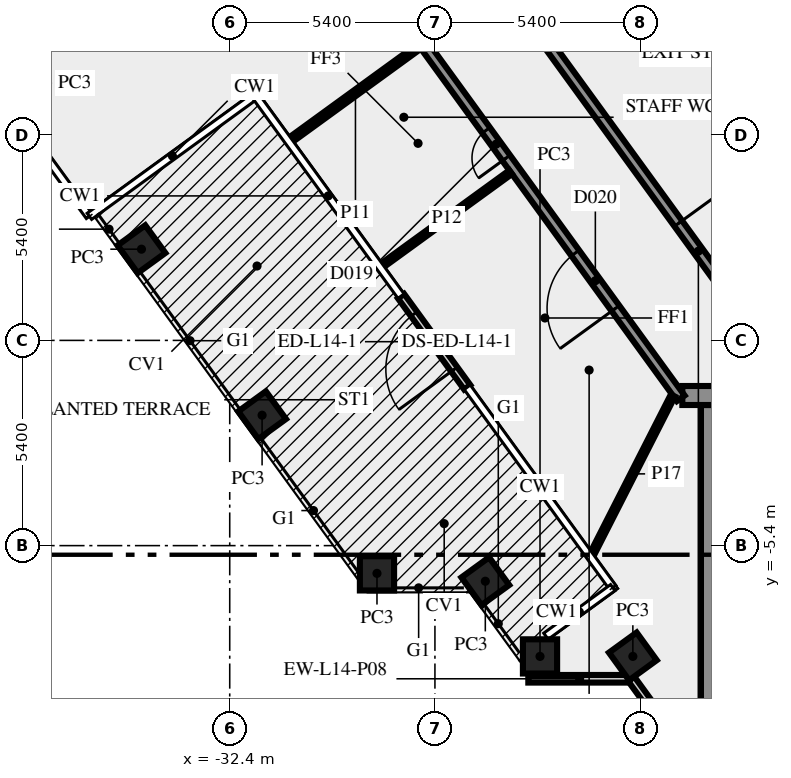
"""IFC4 building model, lengths in metres.
Left out: names, types, materials, properties, quantities, classifications, styles, units other than length and angle.
Written with IfcOpenShell. Run it as: python <this file> out.ifc"""

import sys

from ifc_helpers import new_model, si_unit, direction, frame, frame_2d, origin, origin_2d, place, context, subcontext, project, spatial, rectangle, extrude, element, fill, save


model = new_model("IFC4")
c1 = context("Model", 3, precision=1e-05, world=origin(), true_north=direction((0.0, 1.0)))
c2 = subcontext(c1, "Body", "Model", "MODEL_VIEW")
j1 = project(units=[si_unit("LENGTHUNIT", "METRE"), si_unit("PLANEANGLEUNIT", "RADIAN")], contexts=[c1])
p1 = place(None, origin())
s1 = spatial("IfcSite", under=j1, at=p1, CompositionType="ELEMENT")
p2 = place(p1, origin())
s2 = spatial("IfcBuilding", under=s1, at=p2, CompositionType="ELEMENT")
p3 = place(p2, frame((0.0, 0.0, 63.0)))
s3 = spatial("IfcBuildingStorey", under=s2, at=p3, CompositionType="ELEMENT", Elevation=63.0)
for number, where, z_axis, x_axis in (
    (1, (-34.722, 2.4, 0.0), (0.0, 0.0, 1.0), (0.588, -0.809, 0.0)),
    (2, (-31.548, -1.969, 0.0), (0.0, 0.0, 1.0), (0.588, -0.809, 0.0)),
    (3, (-28.525, -6.13, 0.0), (0.0, 0.0, 1.0), (1.0, 0.0, 0.0)),
    (4, (-25.674, -6.337, 0.0), (0.0, 0.0, 1.0), (0.588, -0.809, 0.0)),
    (5, (-24.235, -8.315, 0.0), (0.0, 0.0, 1.0), (1.0, 0.0, 0.0)),
    (6, (-21.792, -8.315, 0.0), (0.0, 0.0, 1.0), (0.588, -0.809, 0.0)),
):
    element("IfcColumn", number, at=place(p3, frame(where, z_axis=z_axis, x_axis=x_axis)), inside=s3, PredefinedType="COLUMN", context=c2, shape_type="SweptSolid", body=[
        extrude(rectangle(XDim=0.9, YDim=0.9, at=origin_2d()), origin(), (0.0, 0.0, 1.0), 3.65),
    ])
p4 = place(p3, frame((-24.543, -8.904, 0.0), z_axis=(0.0, 0.0, 1.0), x_axis=(1.0, 0.0, 0.0)))
e7 = element("IfcWall", 7, at=p4, inside=s3, PredefinedType="SOLIDWALL", context=c2, shape_type="SweptSolid", body=[
    extrude(rectangle(XDim=2.7, YDim=0.2, at=frame_2d((1.35, 0.0))), origin(), (0.0, 0.0, 1.0), 3.65),
])
p5 = place(p3, frame((-21.833, -8.909, 0.0), z_axis=(0.0, 0.0, 1.0), x_axis=(0.587766567315, -0.809030569476, 0.0)))
e8 = element("IfcWall", 8, at=p5, inside=s3, PredefinedType="SOLIDWALL", context=c2, shape_type="SweptSolid", body=[
    extrude(rectangle(XDim=2.688, YDim=0.2, at=frame_2d((1.344, 0.0))), origin(), (0.0, 0.0, 1.0), 3.65),
])
p6 = place(p3, frame((-26.15, -1.232, 0.0), z_axis=(0.0, 0.0, 1.0), x_axis=(-0.58782869016, 0.808985433135, 0.0)))
e9 = element("IfcWall", 9, at=p6, inside=s3, PredefinedType="SOLIDWALL", context=c2, shape_type="SweptSolid", body=[
    extrude(rectangle(XDim=2.963, YDim=0.2, at=frame_2d((1.481, 0.0))), origin(), (0.0, 0.0, 1.0), 3.65),
])
p7 = place(p6, frame((0.582, 0.0, 0.0)))
e10 = element("IfcOpeningElement", 10, at=p7, cuts=e9, PredefinedType="OPENING", context=c2, shape_type="SweptSolid", body=[
    extrude(rectangle(XDim=1.8, YDim=2.4, at=frame_2d((0.9, 1.2))), frame((0.0, 0.11, 0.0), z_axis=(0.0, -1.0, 0.0), x_axis=(1.0, 0.0, 0.0)), (0.0, 0.0, 1.0), 0.22),
])
p8 = place(p3, frame((-19.75, -10.5, 0.0), z_axis=(0.0, 0.0, 1.0), x_axis=(0.0, 1.0, 0.0)))
e11 = element("IfcWall", 11, at=p8, inside=s3, PredefinedType="SHEAR", context=c2, shape_type="SweptSolid", body=[
    extrude(rectangle(XDim=8.8, YDim=0.5, at=frame_2d((4.4, 0.0))), origin(), (0.0, 0.0, 1.0), 3.65),
])
p9 = place(p3, frame((20.49, -1.45, 0.0), z_axis=(0.0, 0.0, 1.0), x_axis=(-1.0, 0.0, 0.0)))
e12 = element("IfcWall", 12, at=p9, inside=s3, PredefinedType="SHEAR", context=c2, shape_type="SweptSolid", body=[
    extrude(rectangle(XDim=40.98, YDim=0.5, at=frame_2d((20.49, 0.0))), origin(), (0.0, 0.0, 1.0), 3.65),
])
p10 = place(p9, frame((38.14, 0.0, 0.0)))
e13 = element("IfcOpeningElement", 13, at=p10, cuts=e12, PredefinedType="OPENING", context=c2, shape_type="SweptSolid", body=[
    extrude(rectangle(XDim=1.8, YDim=2.1, at=frame_2d((0.9, 1.05))), frame((0.0, 0.26, 0.0), z_axis=(0.0, -1.0, 0.0), x_axis=(1.0, 0.0, 0.0)), (0.0, 0.0, 1.0), 0.52),
])
p11 = place(p9, frame((35.89, 0.0, 0.0)))
e14 = element("IfcOpeningElement", 14, at=p11, cuts=e12, PredefinedType="OPENING", context=c2, shape_type="SweptSolid", body=[
    extrude(rectangle(XDim=0.9, YDim=2.1, at=frame_2d((0.45, 1.05))), frame((0.0, 0.26, 0.0), z_axis=(0.0, -1.0, 0.0), x_axis=(1.0, 0.0, 0.0)), (0.0, 0.0, 1.0), 0.52),
])
p12 = place(p9, frame((32.94, 0.0, 0.0)))
e15 = element("IfcOpeningElement", 15, at=p12, cuts=e12, PredefinedType="OPENING", context=c2, shape_type="SweptSolid", body=[
    extrude(rectangle(XDim=0.9, YDim=2.1, at=frame_2d((0.45, 1.05))), frame((0.0, 0.26, 0.0), z_axis=(0.0, -1.0, 0.0), x_axis=(1.0, 0.0, 0.0)), (0.0, 0.0, 1.0), 0.52),
])
p13 = place(p9, frame((19.59, 0.0, 0.0)))
e16 = element("IfcOpeningElement", 16, at=p13, cuts=e12, PredefinedType="OPENING", context=c2, shape_type="SweptSolid", body=[
    extrude(rectangle(XDim=2.0, YDim=2.1, at=frame_2d((1.0, 1.05))), frame((0.0, 0.26, 0.0), z_axis=(0.0, -1.0, 0.0), x_axis=(1.0, 0.0, 0.0)), (0.0, 0.0, 1.0), 0.52),
])
p14 = place(p9, frame((7.14, 0.0, 0.0)))
e17 = element("IfcOpeningElement", 17, at=p14, cuts=e12, PredefinedType="OPENING", context=c2, shape_type="SweptSolid", body=[
    extrude(rectangle(XDim=0.9, YDim=2.1, at=frame_2d((0.45, 1.05))), frame((0.0, 0.26, 0.0), z_axis=(0.0, -1.0, 0.0), x_axis=(1.0, 0.0, 0.0)), (0.0, 0.0, 1.0), 0.52),
])
p15 = place(p9, frame((5.028, 0.0, 0.0)))
e18 = element("IfcOpeningElement", 18, at=p15, cuts=e12, PredefinedType="OPENING", context=c2, shape_type="SweptSolid", body=[
    extrude(rectangle(XDim=0.8, YDim=2.1, at=frame_2d((0.4, 1.05))), frame((0.0, 0.26, 0.0), z_axis=(0.0, -1.0, 0.0), x_axis=(1.0, 0.0, 0.0)), (0.0, 0.0, 1.0), 0.52),
])
p16 = place(p9, frame((3.452, 0.0, 0.0)))
e19 = element("IfcOpeningElement", 19, at=p16, cuts=e12, PredefinedType="OPENING", context=c2, shape_type="SweptSolid", body=[
    extrude(rectangle(XDim=0.8, YDim=2.1, at=frame_2d((0.4, 1.05))), frame((0.0, 0.26, 0.0), z_axis=(0.0, -1.0, 0.0), x_axis=(1.0, 0.0, 0.0)), (0.0, 0.0, 1.0), 0.52),
])
p17 = place(p9, frame((1.04, 0.0, 0.0)))
e20 = element("IfcOpeningElement", 20, at=p17, cuts=e12, PredefinedType="OPENING", context=c2, shape_type="SweptSolid", body=[
    extrude(rectangle(XDim=1.8, YDim=2.1, at=frame_2d((0.9, 1.05))), frame((0.0, 0.26, 0.0), z_axis=(0.0, -1.0, 0.0), x_axis=(1.0, 0.0, 0.0)), (0.0, 0.0, 1.0), 0.52),
])
p18 = place(p3, frame((-20.531, -1.523, 0.0), z_axis=(0.0, 0.0, 1.0), x_axis=(-0.587784593204, 0.809017473231, 0.0)))
e21 = element("IfcWall", 21, at=p18, inside=s3, PredefinedType="SOLIDWALL", context=c2, shape_type="SweptSolid", body=[
    extrude(rectangle(XDim=44.67, YDim=0.25, at=frame_2d((22.335, 0.0))), origin(), (0.0, 0.0, 1.0), 3.65),
])
p19 = place(p18, frame((43.046, 0.0, 0.0)))
e22 = element("IfcOpeningElement", 22, at=p19, cuts=e21, PredefinedType="OPENING", context=c2, shape_type="SweptSolid", body=[
    extrude(rectangle(XDim=1.2, YDim=2.1, at=frame_2d((0.6, 1.05))), frame((0.0, 0.135, 0.0), z_axis=(0.0, -1.0, 0.0), x_axis=(1.0, 0.0, 0.0)), (0.0, 0.0, 1.0), 0.27),
])
p20 = place(p18, frame((21.266, 0.0, 0.0)))
e23 = element("IfcOpeningElement", 23, at=p20, cuts=e21, PredefinedType="OPENING", context=c2, shape_type="SweptSolid", body=[
    extrude(rectangle(XDim=1.2, YDim=2.1, at=frame_2d((0.6, 1.05))), frame((0.0, 0.135, 0.0), z_axis=(0.0, -1.0, 0.0), x_axis=(1.0, 0.0, 0.0)), (0.0, 0.0, 1.0), 0.27),
])
p21 = place(p18, frame((17.015, 0.0, 0.0)))
e24 = element("IfcOpeningElement", 24, at=p21, cuts=e21, PredefinedType="OPENING", context=c2, shape_type="SweptSolid", body=[
    extrude(rectangle(XDim=0.9, YDim=2.1, at=frame_2d((0.45, 1.05))), frame((0.0, 0.135, 0.0), z_axis=(0.0, -1.0, 0.0), x_axis=(1.0, 0.0, 0.0)), (0.0, 0.0, 1.0), 0.27),
])
p22 = place(p18, frame((2.924, 0.0, 0.0)))
e25 = element("IfcOpeningElement", 25, at=p22, cuts=e21, PredefinedType="OPENING", context=c2, shape_type="SweptSolid", body=[
    extrude(rectangle(XDim=1.8, YDim=2.1, at=frame_2d((0.9, 1.05))), frame((0.0, 0.135, 0.0), z_axis=(0.0, -1.0, 0.0), x_axis=(1.0, 0.0, 0.0)), (0.0, 0.0, 1.0), 0.27),
])
p23 = place(p18, frame((18.616, 0.0, 0.0)))
e26 = element("IfcOpeningElement", 26, at=p23, cuts=e21, PredefinedType="OPENING", context=c2, shape_type="SweptSolid", body=[
    extrude(rectangle(XDim=0.9, YDim=2.1, at=frame_2d((0.45, 1.05))), frame((0.0, 0.135, 0.0), z_axis=(0.0, -1.0, 0.0), x_axis=(1.0, 0.0, 0.0)), (0.0, 0.0, 1.0), 0.27),
])
p24 = place(p18, frame((7.816, 0.0, 0.0)))
e27 = element("IfcOpeningElement", 27, at=p24, cuts=e21, PredefinedType="OPENING", context=c2, shape_type="SweptSolid", body=[
    extrude(rectangle(XDim=0.9, YDim=2.1, at=frame_2d((0.45, 1.05))), frame((0.0, 0.135, 0.0), z_axis=(0.0, -1.0, 0.0), x_axis=(1.0, 0.0, 0.0)), (0.0, 0.0, 1.0), 0.27),
])
p25 = place(p3, frame((-37.232, 25.972, 0.0), z_axis=(0.0, 0.0, 1.0), x_axis=(0.587786323093, -0.809016216391, 0.0)))
e28 = element("IfcWall", 28, at=p25, inside=s3, PredefinedType="SOLIDWALL", context=c2, shape_type="SweptSolid", body=[
    extrude(rectangle(XDim=33.493, YDim=0.25, at=frame_2d((16.747, 0.0))), origin(), (0.0, 0.0, 1.0), 3.65),
])
p26 = place(p25, frame((28.301, 0.0, 0.0)))
e29 = element("IfcOpeningElement", 29, at=p26, cuts=e28, PredefinedType="OPENING", context=c2, shape_type="SweptSolid", body=[
    extrude(rectangle(XDim=1.8, YDim=2.1, at=frame_2d((0.9, 1.05))), frame((0.0, 0.135, 0.0), z_axis=(0.0, -1.0, 0.0), x_axis=(1.0, 0.0, 0.0)), (0.0, 0.0, 1.0), 0.27),
])
p27 = place(p25, frame((4.235, 0.0, 0.0)))
e30 = element("IfcOpeningElement", 30, at=p27, cuts=e28, PredefinedType="OPENING", context=c2, shape_type="SweptSolid", body=[
    extrude(rectangle(XDim=1.8, YDim=2.1, at=frame_2d((0.9, 1.05))), frame((0.0, 0.135, 0.0), z_axis=(0.0, -1.0, 0.0), x_axis=(1.0, 0.0, 0.0)), (0.0, 0.0, 1.0), 0.27),
])
p28 = place(p25, frame((2.685, 0.0, 0.0)))
e31 = element("IfcOpeningElement", 31, at=p28, cuts=e28, PredefinedType="OPENING", context=c2, shape_type="SweptSolid", body=[
    extrude(rectangle(XDim=0.9, YDim=2.1, at=frame_2d((0.45, 1.05))), frame((0.0, 0.135, 0.0), z_axis=(0.0, -1.0, 0.0), x_axis=(1.0, 0.0, 0.0)), (0.0, 0.0, 1.0), 0.27),
])
p29 = place(p3, frame((-31.356, 13.164, 0.0), z_axis=(0.0, 0.0, 1.0), x_axis=(-0.809102944047, -0.587666934526, 0.0)))
e32 = element("IfcWall", 32, at=p29, inside=s3, PredefinedType="PARTITIONING", context=c2, shape_type="SweptSolid", body=[
    extrude(rectangle(XDim=9.55, YDim=0.15, at=frame_2d((4.775, 0.0))), origin(), (0.0, 0.0, 1.0), 2.75),
])
p30 = place(p3, frame((-30.77, 5.296, 0.0), z_axis=(0.0, 0.0, 1.0), x_axis=(0.80906417205, 0.587720312313, 0.0)))
e33 = element("IfcWall", 33, at=p30, inside=s3, PredefinedType="PARTITIONING", context=c2, shape_type="SweptSolid", body=[
    extrude(rectangle(XDim=4.149, YDim=0.15, at=frame_2d((2.075, 0.0))), origin(), (0.0, 0.0, 1.0), 3.65),
])
p31 = place(p3, frame((-25.008, 4.427, 0.0), z_axis=(0.0, 0.0, 1.0), x_axis=(-0.809020893444, -0.587779885646, 0.0)))
e34 = element("IfcWall", 34, at=p31, inside=s3, PredefinedType="PARTITIONING", context=c2, shape_type="SweptSolid", body=[
    extrude(rectangle(XDim=4.15, YDim=0.12, at=frame_2d((2.075, 0.0))), origin(), (0.0, 0.0, 1.0), 3.65),
])
p32 = place(p3, frame((-22.84, -5.574, 0.0), z_axis=(0.0, 0.0, 1.0), x_axis=(0.453931312426, 0.891036679155, 0.0)))
e35 = element("IfcWall", 35, at=p32, inside=s3, PredefinedType="PARTITIONING", context=c2, shape_type="SweptSolid", body=[
    extrude(rectangle(XDim=4.629, YDim=0.12, at=frame_2d((2.314, 0.0))), origin(), (0.0, 0.0, 1.0), 3.65),
])
p33 = place(p7, origin())
e36 = element("IfcDoor", 36, at=p33, inside=s3, OperationType="DOUBLE_DOOR_SINGLE_SWING", PredefinedType="DOOR", context=c2, shape_type="SweptSolid", body=[
    extrude(rectangle(XDim=1.8, YDim=2.4, at=frame_2d((0.9, 1.2))), frame((0.0, 0.025, 0.0), z_axis=(0.0, -1.0, 0.0), x_axis=(1.0, 0.0, 0.0)), (0.0, 0.0, 1.0), 0.05),
])
fill(e10, e36)
p34 = place(p26, origin())
e37 = element("IfcDoor", 37, at=p34, inside=s3, OperationType="DOUBLE_DOOR_SINGLE_SWING", PredefinedType="DOOR", context=c2, shape_type="SweptSolid", body=[
    extrude(rectangle(XDim=1.8, YDim=2.1, at=frame_2d((0.9, 1.05))), frame((0.0, 0.025, 0.0), z_axis=(0.0, -1.0, 0.0), x_axis=(1.0, 0.0, 0.0)), (0.0, 0.0, 1.0), 0.05),
])
fill(e29, e37)
p35 = place(p22, origin())
e38 = element("IfcDoor", 38, at=p35, inside=s3, OperationType="DOUBLE_DOOR_SINGLE_SWING", PredefinedType="DOOR", context=c2, shape_type="SweptSolid", body=[
    extrude(rectangle(XDim=1.8, YDim=2.1, at=frame_2d((0.9, 1.05))), frame((0.0, 0.025, 0.0), z_axis=(0.0, -1.0, 0.0), x_axis=(1.0, 0.0, 0.0)), (0.0, 0.0, 1.0), 0.05),
])
fill(e25, e38)
p36 = place(p24, origin())
e39 = element("IfcDoor", 39, at=p36, inside=s3, OperationType="SINGLE_SWING_LEFT", PredefinedType="DOOR", context=c2, shape_type="SweptSolid", body=[
    extrude(rectangle(XDim=0.9, YDim=2.1, at=frame_2d((0.45, 1.05))), frame((0.0, 0.025, 0.0), z_axis=(0.0, -1.0, 0.0), x_axis=(1.0, 0.0, 0.0)), (0.0, 0.0, 1.0), 0.05),
])
fill(e27, e39)
save(model, sys.argv[1])
